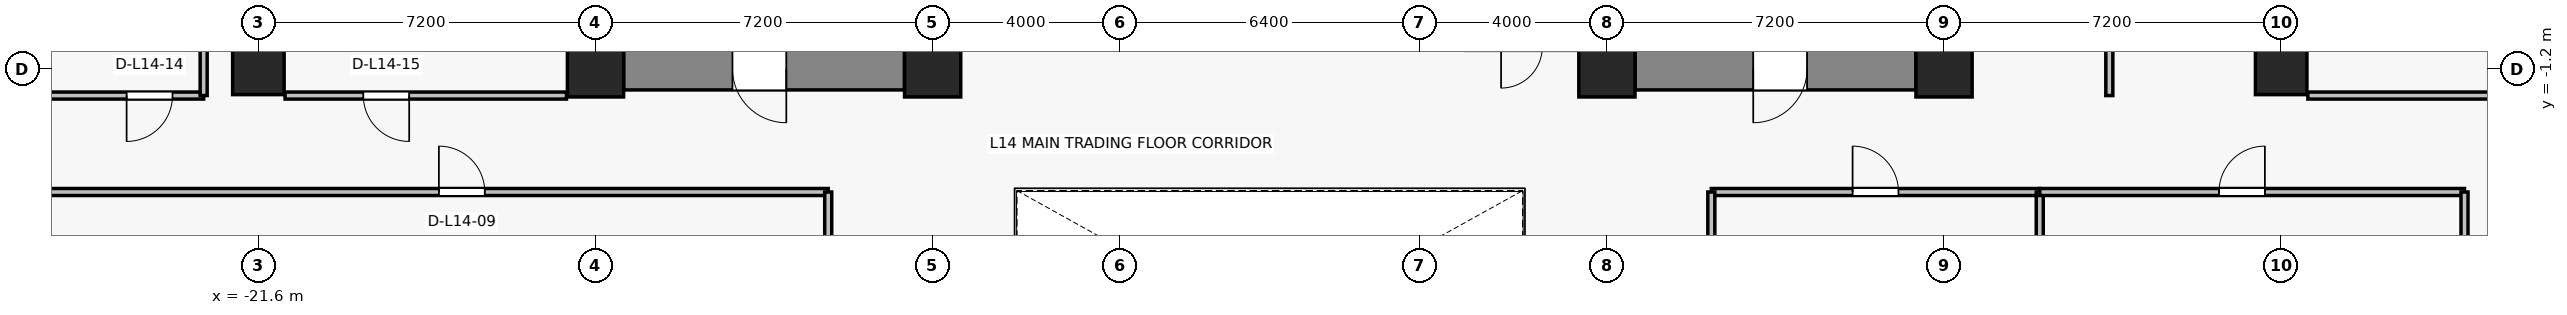
"""IFC4 building model, lengths in metres.
Left out: names, types, materials, properties, quantities, classifications, styles, units other than length and angle.
Written with IfcOpenShell. Run it as: python <this file> out.ifc"""

import sys

from ifc_helpers import new_model, si_unit, direction, frame, frame_2d, origin, origin_2d, place, context, subcontext, project, spatial, rectangle, extrude, source, transform, mapped, element, fill, save


model = new_model("IFC4")
c1 = context("Model", 3, precision=1e-05, world=origin(), true_north=direction((0.0, 1.0)))
c2 = subcontext(c1, "Body", "Model", "MODEL_VIEW")
j1 = project(units=[si_unit("LENGTHUNIT", "METRE"), si_unit("PLANEANGLEUNIT", "RADIAN")], contexts=[c1])
p1 = place(None, origin())
s1 = spatial("IfcSite", under=j1, at=p1, CompositionType="ELEMENT")
p2 = place(p1, origin())
s2 = spatial("IfcBuilding", under=s1, at=p2, CompositionType="ELEMENT")
p3 = place(p2, frame((0.0, 0.0, 53.8)))
s3 = spatial("IfcBuildingStorey", under=s2, at=p3, CompositionType="ELEMENT", Elevation=53.8)
for number, where, z_axis, x_axis in (
    (1, (-14.4, -1.2, 0.0), (0.0, 0.0, 1.0), (1.0, 0.0, 0.0)),
    (2, (-7.2, -1.2, 0.0), (0.0, 0.0, 1.0), (1.0, 0.0, 0.0)),
    (3, (7.2, -1.2, 0.0), (0.0, 0.0, 1.0), (1.0, 0.0, 0.0)),
    (4, (14.4, -1.2, 0.0), (0.0, 0.0, 1.0), (1.0, 0.0, 0.0)),
):
    element("IfcColumn", number, at=place(p3, frame(where, z_axis=z_axis, x_axis=x_axis)), inside=s3, PredefinedType="COLUMN", context=c2, shape_type="SweptSolid", body=[
        extrude(rectangle(XDim=1.2, YDim=1.2, at=origin_2d()), origin(), (0.0, 0.0, 1.0), 3.3),
    ])
for number, where, z_axis, x_axis in (
    (5, (-21.6, -1.2, 0.0), (0.0, 0.0, 1.0), (1.0, 0.0, 0.0)),
    (6, (21.6, -1.2, 0.0), (0.0, 0.0, 1.0), (1.0, 0.0, 0.0)),
):
    element("IfcColumn", number, at=place(p3, frame(where, z_axis=z_axis, x_axis=x_axis)), inside=s3, PredefinedType="COLUMN", context=c2, shape_type="SweptSolid", body=[
        extrude(rectangle(XDim=1.1, YDim=1.1, at=origin_2d()), origin(), (0.0, 0.0, 1.0), 3.3),
    ])
p4 = place(p3, frame((-7.8, -1.2, 0.0), z_axis=(0.0, 0.0, 1.0), x_axis=(-1.0, 0.0, 0.0)))
e7 = element("IfcWall", 7, at=p4, inside=s3, PredefinedType="SHEAR", context=c2, shape_type="SweptSolid", body=[
    extrude(rectangle(XDim=6.0, YDim=0.9, at=frame_2d((3.0, 0.0))), origin(), (0.0, 0.0, 1.0), 3.075),
])
p5 = place(p4, frame((2.525, 0.0, 0.0)))
e8 = element("IfcOpeningElement", 8, at=p5, cuts=e7, PredefinedType="OPENING", context=c2, shape_type="SweptSolid", body=[
    extrude(rectangle(XDim=1.15, YDim=2.15, at=frame_2d((0.575, 1.075))), frame((0.0, 0.46, 0.0), z_axis=(0.0, -1.0, 0.0), x_axis=(1.0, 0.0, 0.0)), (0.0, 0.0, 1.0), 0.92),
])
p6 = place(p3, frame((13.8, -1.2, 0.0), z_axis=(0.0, 0.0, 1.0), x_axis=(-1.0, 0.0, 0.0)))
e9 = element("IfcWall", 9, at=p6, inside=s3, PredefinedType="SHEAR", context=c2, shape_type="SweptSolid", body=[
    extrude(rectangle(XDim=6.0, YDim=0.9, at=frame_2d((3.0, 0.0))), origin(), (0.0, 0.0, 1.0), 3.075),
])
p7 = place(p6, frame((2.325, 0.0, 0.0)))
e10 = element("IfcOpeningElement", 10, at=p7, cuts=e9, PredefinedType="OPENING", context=c2, shape_type="SweptSolid", body=[
    extrude(rectangle(XDim=1.15, YDim=2.15, at=frame_2d((0.575, 1.075))), frame((0.0, 0.46, 0.0), z_axis=(0.0, -1.0, 0.0), x_axis=(1.0, 0.0, 0.0)), (0.0, 0.0, 1.0), 0.92),
])
p8 = place(p3, frame((-28.53, -3.83, 0.0), z_axis=(0.0, 0.0, 1.0), x_axis=(1.0, 0.0, 0.0)))
e11 = element("IfcWall", 11, at=p8, inside=s3, PredefinedType="PARTITIONING", context=c2, shape_type="SweptSolid", body=[
    extrude(rectangle(XDim=19.1, YDim=0.15, at=frame_2d((9.55, 0.0))), origin(), (0.0, 0.0, 1.0), 2.465),
])
p9 = place(p8, frame((10.785, 0.0, 0.0)))
e12 = element("IfcOpeningElement", 12, at=p9, cuts=e11, PredefinedType="OPENING", context=c2, shape_type="SweptSolid", body=[
    extrude(rectangle(XDim=0.98, YDim=2.15, at=frame_2d((0.49, 1.075))), frame((0.0, 0.085, 0.0), z_axis=(0.0, -1.0, 0.0), x_axis=(1.0, 0.0, 0.0)), (0.0, 0.0, 1.0), 0.17),
])
p10 = place(p3, frame((-9.43, -3.83, 0.0), z_axis=(0.0, 0.0, 1.0), x_axis=(0.0, -1.0, 0.0)))
e13 = element("IfcWall", 13, at=p10, inside=s3, PredefinedType="PARTITIONING", context=c2, shape_type="SweptSolid", body=[
    extrude(rectangle(XDim=8.49, YDim=0.15, at=frame_2d((4.245, 0.0))), origin(), (0.0, 0.0, 1.0), 2.465),
])
p11 = place(p3, frame((9.43, -3.83, 0.0), z_axis=(0.0, 0.0, 1.0), x_axis=(1.0, 0.0, 0.0)))
e14 = element("IfcWall", 14, at=p11, inside=s3, PredefinedType="PARTITIONING", context=c2, shape_type="SweptSolid", body=[
    extrude(rectangle(XDim=7.015, YDim=0.15, at=frame_2d((3.507, 0.0))), origin(), (0.0, 0.0, 1.0), 2.465),
])
p12 = place(p11, frame((3.017, 0.0, 0.0)))
e15 = element("IfcOpeningElement", 15, at=p12, cuts=e14, PredefinedType="OPENING", context=c2, shape_type="SweptSolid", body=[
    extrude(rectangle(XDim=0.98, YDim=2.15, at=frame_2d((0.49, 1.075))), frame((0.0, 0.085, 0.0), z_axis=(0.0, -1.0, 0.0), x_axis=(1.0, 0.0, 0.0)), (0.0, 0.0, 1.0), 0.17),
])
for number, where, z_axis, x_axis in (
    (16, (9.43, -12.32, 0.0), (0.0, 0.0, 1.0), (0.0, 1.0, 0.0)),
    (17, (16.445, -3.83, 0.0), (0.0, 0.0, 1.0), (0.0, -1.0, 0.0)),
):
    element("IfcWall", number, at=place(p3, frame(where, z_axis=z_axis, x_axis=x_axis)), inside=s3, PredefinedType="PARTITIONING", context=c2, shape_type="SweptSolid", body=[
        extrude(rectangle(XDim=8.49, YDim=0.15, at=frame_2d((4.245, 0.0))), origin(), (0.0, 0.0, 1.0), 2.465),
    ])
p13 = place(p3, frame((16.445, -3.83, 0.0), z_axis=(0.0, 0.0, 1.0), x_axis=(1.0, 0.0, 0.0)))
e18 = element("IfcWall", 18, at=p13, inside=s3, PredefinedType="PARTITIONING", context=c2, shape_type="SweptSolid", body=[
    extrude(rectangle(XDim=9.071, YDim=0.15, at=frame_2d((4.535, 0.0))), origin(), (0.0, 0.0, 1.0), 2.465),
])
p14 = place(p13, frame((3.827, 0.0, 0.0)))
e19 = element("IfcOpeningElement", 19, at=p14, cuts=e18, PredefinedType="OPENING", context=c2, shape_type="SweptSolid", body=[
    extrude(rectangle(XDim=0.98, YDim=2.15, at=frame_2d((0.49, 1.075))), frame((0.0, 0.085, 0.0), z_axis=(0.0, -1.0, 0.0), x_axis=(1.0, 0.0, 0.0)), (0.0, 0.0, 1.0), 0.17),
])
p15 = place(p3, frame((25.515, -3.83, 0.0), z_axis=(0.0, 0.0, 1.0), x_axis=(0.0, -1.0, 0.0)))
e20 = element("IfcWall", 20, at=p15, inside=s3, PredefinedType="PARTITIONING", context=c2, shape_type="SweptSolid", body=[
    extrude(rectangle(XDim=8.49, YDim=0.15, at=frame_2d((4.245, 0.0))), origin(), (0.0, 0.0, 1.0), 2.465),
])
p16 = place(p3, frame((-22.769, -1.77, 0.0), z_axis=(0.0, 0.0, 1.0), x_axis=(-1.0, 0.0, 0.0)))
e21 = element("IfcWall", 21, at=p16, inside=s3, PredefinedType="PARTITIONING", context=c2, shape_type="SweptSolid", body=[
    extrude(rectangle(XDim=5.761, YDim=0.15, at=frame_2d((2.881, 0.0))), origin(), (0.0, 0.0, 1.0), 2.465),
])
p17 = place(p16, frame((0.666, 0.0, 0.0)))
e22 = element("IfcOpeningElement", 22, at=p17, cuts=e21, PredefinedType="OPENING", context=c2, shape_type="SweptSolid", body=[
    extrude(rectangle(XDim=0.98, YDim=2.15, at=frame_2d((0.49, 1.075))), frame((0.0, 0.085, 0.0), z_axis=(0.0, -1.0, 0.0), x_axis=(1.0, 0.0, 0.0)), (0.0, 0.0, 1.0), 0.17),
])
p18 = place(p3, frame((-22.769, 13.88, 0.0), z_axis=(0.0, 0.0, 1.0), x_axis=(0.0, -1.0, 0.0)))
e23 = element("IfcWall", 23, at=p18, inside=s3, PredefinedType="PARTITIONING", context=c2, shape_type="SweptSolid", body=[
    extrude(rectangle(XDim=15.65, YDim=0.15, at=frame_2d((7.825, 0.0))), origin(), (0.0, 0.0, 1.0), 2.465),
])
p19 = place(p3, frame((-15.02, -1.77, 0.0), z_axis=(0.0, 0.0, 1.0), x_axis=(-1.0, 0.0, 0.0)))
e24 = element("IfcWall", 24, at=p19, inside=s3, PredefinedType="PARTITIONING", context=c2, shape_type="SweptSolid", body=[
    extrude(rectangle(XDim=6.01, YDim=0.15, at=frame_2d((3.005, 0.0))), origin(), (0.0, 0.0, 1.0), 3.075),
])
p20 = place(p19, frame((3.359, 0.0, 0.0)))
e25 = element("IfcOpeningElement", 25, at=p20, cuts=e24, PredefinedType="OPENING", context=c2, shape_type="SweptSolid", body=[
    extrude(rectangle(XDim=0.98, YDim=2.15, at=frame_2d((0.49, 1.075))), frame((0.0, 0.085, 0.0), z_axis=(0.0, -1.0, 0.0), x_axis=(1.0, 0.0, 0.0)), (0.0, 0.0, 1.0), 0.17),
])
p21 = place(p3, frame((32.53, -1.77, 0.0), z_axis=(0.0, 0.0, 1.0), x_axis=(-1.0, 0.0, 0.0)))
e26 = element("IfcWall", 26, at=p21, inside=s3, PredefinedType="PARTITIONING", context=c2, shape_type="SweptSolid", body=[
    extrude(rectangle(XDim=10.36, YDim=0.15, at=frame_2d((5.18, 0.0))), origin(), (0.0, 0.0, 1.0), 2.465),
])
p22 = place(p3, frame((17.93, -1.77, 0.0), z_axis=(0.0, 0.0, 1.0), x_axis=(0.0, 1.0, 0.0)))
e27 = element("IfcWall", 27, at=p22, inside=s3, PredefinedType="PARTITIONING", context=c2, shape_type="SweptSolid", body=[
    extrude(rectangle(XDim=15.65, YDim=0.15, at=frame_2d((7.825, 0.0))), origin(), (0.0, 0.0, 1.0), 2.465),
])
p23 = place(p22, frame((7.335, 0.0, 0.0)))
e28 = element("IfcOpeningElement", 28, at=p23, cuts=e27, PredefinedType="OPENING", context=c2, shape_type="SweptSolid", body=[
    extrude(rectangle(XDim=0.98, YDim=2.15, at=frame_2d((0.49, 1.075))), frame((0.0, 0.085, 0.0), z_axis=(0.0, -1.0, 0.0), x_axis=(1.0, 0.0, 0.0)), (0.0, 0.0, 1.0), 0.17),
])
m1 = source(origin(), c2, "Body", "SweptSolid", [
    extrude(rectangle(XDim=1.15, YDim=2.15, at=frame_2d((0.575, 1.075))), frame((0.0, 0.025, 0.0), z_axis=(0.0, -1.0, 0.0), x_axis=(1.0, 0.0, 0.0)), (0.0, 0.0, 1.0), 0.05),
])
p24 = place(p5, origin())
e29 = element("IfcDoor", 29, at=p24, inside=s3, OperationType="SINGLE_SWING_LEFT", PredefinedType="DOOR", context=c2, shape_type="MappedRepresentation", body=[
    mapped(m1, transform((0.0, 0.0, 0.0), x_axis=(1.0, 0.0, 0.0), y_axis=(0.0, 1.0, 0.0), z_axis=(0.0, 0.0, 1.0), scale=1.0)),
])
fill(e8, e29)
p25 = place(p7, origin())
e30 = element("IfcDoor", 30, at=p25, inside=s3, OperationType="SINGLE_SWING_RIGHT", PredefinedType="DOOR", context=c2, shape_type="MappedRepresentation", body=[
    mapped(m1, transform((0.0, 0.0, 0.0), x_axis=(1.0, 0.0, 0.0), y_axis=(0.0, 1.0, 0.0), z_axis=(0.0, 0.0, 1.0), scale=1.0)),
])
fill(e10, e30)
m2 = source(origin(), c2, "Body", "SweptSolid", [
    extrude(rectangle(XDim=0.98, YDim=2.15, at=frame_2d((0.49, 1.075))), frame((0.0, 0.025, 0.0), z_axis=(0.0, -1.0, 0.0), x_axis=(1.0, 0.0, 0.0)), (0.0, 0.0, 1.0), 0.05),
])
p26 = place(p9, origin())
e31 = element("IfcDoor", 31, at=p26, inside=s3, OperationType="SINGLE_SWING_LEFT", PredefinedType="DOOR", context=c2, shape_type="MappedRepresentation", body=[
    mapped(m2, transform((0.0, 0.0, 0.0), x_axis=(1.0, 0.0, 0.0), y_axis=(0.0, 1.0, 0.0), z_axis=(0.0, 0.0, 1.0), scale=1.0)),
])
fill(e12, e31)
p27 = place(p12, origin())
e32 = element("IfcDoor", 32, at=p27, inside=s3, OperationType="SINGLE_SWING_LEFT", PredefinedType="DOOR", context=c2, shape_type="MappedRepresentation", body=[
    mapped(m2, transform((0.0, 0.0, 0.0), x_axis=(1.0, 0.0, 0.0), y_axis=(0.0, 1.0, 0.0), z_axis=(0.0, 0.0, 1.0), scale=1.0)),
])
fill(e15, e32)
p28 = place(p14, origin())
e33 = element("IfcDoor", 33, at=p28, inside=s3, OperationType="SINGLE_SWING_RIGHT", PredefinedType="DOOR", context=c2, shape_type="MappedRepresentation", body=[
    mapped(m2, transform((0.0, 0.0, 0.0), x_axis=(1.0, 0.0, 0.0), y_axis=(0.0, 1.0, 0.0), z_axis=(0.0, 0.0, 1.0), scale=1.0)),
])
fill(e19, e33)
p29 = place(p17, origin())
e34 = element("IfcDoor", 34, at=p29, inside=s3, OperationType="SINGLE_SWING_RIGHT", PredefinedType="DOOR", context=c2, shape_type="MappedRepresentation", body=[
    mapped(m2, transform((0.0, 0.0, 0.0), x_axis=(1.0, 0.0, 0.0), y_axis=(0.0, 1.0, 0.0), z_axis=(0.0, 0.0, 1.0), scale=1.0)),
])
fill(e22, e34)
p30 = place(p20, origin())
e35 = element("IfcDoor", 35, at=p30, inside=s3, OperationType="SINGLE_SWING_LEFT", PredefinedType="DOOR", context=c2, shape_type="MappedRepresentation", body=[
    mapped(m2, transform((0.0, 0.0, 0.0), x_axis=(1.0, 0.0, 0.0), y_axis=(0.0, 1.0, 0.0), z_axis=(0.0, 0.0, 1.0), scale=1.0)),
])
fill(e25, e35)
save(model, sys.argv[1])
